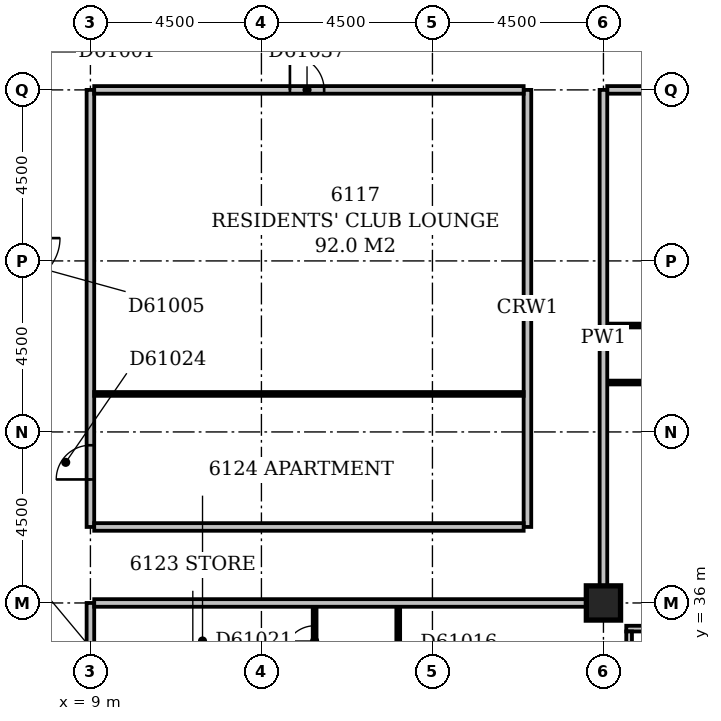
"""IFC4 building model, lengths in metres.
Left out: names, types, materials, properties, quantities, classifications, styles, units other than length and angle.
Written with IfcOpenShell. Run it as: python <this file> out.ifc"""

import sys

from ifc_helpers import new_model, si_unit, direction, frame, frame_2d, origin, origin_2d, place, context, subcontext, project, spatial, rectangle, extrude, element, fill, save


model = new_model("IFC4")
c1 = context("Model", 3, precision=1e-05, world=origin(), true_north=direction((0.0, 1.0)))
c2 = subcontext(c1, "Body", "Model", "MODEL_VIEW")
j1 = project(units=[si_unit("LENGTHUNIT", "METRE"), si_unit("PLANEANGLEUNIT", "RADIAN")], contexts=[c1])
p1 = place(None, origin())
s1 = spatial("IfcSite", under=j1, at=p1, CompositionType="ELEMENT")
p2 = place(p1, origin())
s2 = spatial("IfcBuilding", under=s1, at=p2, CompositionType="ELEMENT")
p3 = place(p2, frame((0.0, 0.0, 236.6)))
s3 = spatial("IfcBuildingStorey", under=s2, at=p3, CompositionType="ELEMENT", Elevation=236.6)
p4 = place(p3, frame((22.5, 36.0, -0.3), z_axis=(0.0, 0.0, 1.0), x_axis=(1.0, 0.0, 0.0)))
e1 = element("IfcColumn", 1, at=p4, inside=s3, PredefinedType="COLUMN", context=c2, shape_type="SweptSolid", body=[
    extrude(rectangle(XDim=0.9, YDim=0.9, at=origin_2d()), origin(), (0.0, 0.0, 1.0), 3.6),
])
p5 = place(p3, frame((23.175, 17.4, 0.0), z_axis=(0.0, 0.0, 1.0), x_axis=(0.0, 1.0, 0.0)))
e2 = element("IfcWall", 2, at=p5, inside=s3, PredefinedType="STANDARD", context=c2, shape_type="SweptSolid", body=[
    extrude(rectangle(XDim=17.85, YDim=0.15, at=frame_2d((8.925, 0.0))), origin(), (0.0, 0.0, 1.0), 2.7),
])
p6 = place(p5, frame((1.357, 0.0, 0.6)))
e3 = element("IfcOpeningElement", 3, at=p6, cuts=e2, PredefinedType="OPENING", context=c2, shape_type="SweptSolid", body=[
    extrude(rectangle(XDim=2.1, YDim=1.8, at=frame_2d((1.05, 0.9))), frame((0.0, 0.087, 0.0), z_axis=(0.0, -1.0, 0.0), x_axis=(1.0, 0.0, 0.0)), (0.0, 0.0, 1.0), 0.174),
])
p7 = place(p5, frame((6.15, 0.0, 0.6)))
e4 = element("IfcOpeningElement", 4, at=p7, cuts=e2, PredefinedType="OPENING", context=c2, shape_type="SweptSolid", body=[
    extrude(rectangle(XDim=2.4, YDim=1.8, at=frame_2d((1.2, 0.9))), frame((0.0, 0.087, 0.0), z_axis=(0.0, -1.0, 0.0), x_axis=(1.0, 0.0, 0.0)), (0.0, 0.0, 1.0), 0.174),
])
p8 = place(p5, frame((10.65, 0.0, 0.6)))
e5 = element("IfcOpeningElement", 5, at=p8, cuts=e2, PredefinedType="OPENING", context=c2, shape_type="SweptSolid", body=[
    extrude(rectangle(XDim=2.4, YDim=1.8, at=frame_2d((1.2, 0.9))), frame((0.0, 0.087, 0.0), z_axis=(0.0, -1.0, 0.0), x_axis=(1.0, 0.0, 0.0)), (0.0, 0.0, 1.0), 0.174),
])
p9 = place(p5, frame((15.15, 0.0, 0.6)))
e6 = element("IfcOpeningElement", 6, at=p9, cuts=e2, PredefinedType="OPENING", context=c2, shape_type="SweptSolid", body=[
    extrude(rectangle(XDim=2.4, YDim=1.8, at=frame_2d((1.2, 0.9))), frame((0.0, 0.087, 0.0), z_axis=(0.0, -1.0, 0.0), x_axis=(1.0, 0.0, 0.0)), (0.0, 0.0, 1.0), 0.174),
])
p10 = place(p3, frame((23.1, 35.325, 0.0), z_axis=(0.0, 0.0, 1.0), x_axis=(1.0, 0.0, 0.0)))
e7 = element("IfcWall", 7, at=p10, inside=s3, PredefinedType="STANDARD", context=c2, shape_type="SweptSolid", body=[
    extrude(rectangle(XDim=18.15, YDim=0.15, at=frame_2d((9.075, 0.0))), origin(), (0.0, 0.0, 1.0), 2.7),
])
p11 = place(p10, frame((0.45, 0.0, 0.6)))
e8 = element("IfcOpeningElement", 8, at=p11, cuts=e7, PredefinedType="OPENING", context=c2, shape_type="SweptSolid", body=[
    extrude(rectangle(XDim=2.4, YDim=1.8, at=frame_2d((1.2, 0.9))), frame((0.0, 0.087, 0.0), z_axis=(0.0, -1.0, 0.0), x_axis=(1.0, 0.0, 0.0)), (0.0, 0.0, 1.0), 0.174),
])
p12 = place(p10, frame((5.242, 0.0, 0.6)))
e9 = element("IfcOpeningElement", 9, at=p12, cuts=e7, PredefinedType="OPENING", context=c2, shape_type="SweptSolid", body=[
    extrude(rectangle(XDim=2.4, YDim=1.8, at=frame_2d((1.2, 0.9))), frame((0.0, 0.087, 0.0), z_axis=(0.0, -1.0, 0.0), x_axis=(1.0, 0.0, 0.0)), (0.0, 0.0, 1.0), 0.174),
])
p13 = place(p10, frame((9.45, 0.0, 0.6)))
e10 = element("IfcOpeningElement", 10, at=p13, cuts=e7, PredefinedType="OPENING", context=c2, shape_type="SweptSolid", body=[
    extrude(rectangle(XDim=2.4, YDim=1.8, at=frame_2d((1.2, 0.9))), frame((0.0, 0.087, 0.0), z_axis=(0.0, -1.0, 0.0), x_axis=(1.0, 0.0, 0.0)), (0.0, 0.0, 1.0), 0.174),
])
p14 = place(p10, frame((13.95, 0.0, 0.6)))
e11 = element("IfcOpeningElement", 11, at=p14, cuts=e7, PredefinedType="OPENING", context=c2, shape_type="SweptSolid", body=[
    extrude(rectangle(XDim=2.4, YDim=1.8, at=frame_2d((1.2, 0.9))), frame((0.0, 0.087, 0.0), z_axis=(0.0, -1.0, 0.0), x_axis=(1.0, 0.0, 0.0)), (0.0, 0.0, 1.0), 0.174),
])
p15 = place(p3, frame((17.1, 17.4, 0.0), z_axis=(0.0, 0.0, 1.0), x_axis=(0.0, 1.0, 0.0)))
e12 = element("IfcWall", 12, at=p15, inside=s3, PredefinedType="PARTITIONING", context=c2, shape_type="SweptSolid", body=[
    extrude(rectangle(XDim=18.5, YDim=0.1, at=frame_2d((9.25, 0.0))), origin(), (0.0, 0.0, 1.0), 3.3),
])
p16 = place(p15, frame((4.6, 0.0, 0.0)))
e13 = element("IfcOpeningElement", 13, at=p16, cuts=e12, PredefinedType="OPENING", context=c2, shape_type="SweptSolid", body=[
    extrude(rectangle(XDim=0.9, YDim=2.1, at=frame_2d((0.45, 1.05))), frame((0.0, 0.062, 0.0), z_axis=(0.0, -1.0, 0.0), x_axis=(1.0, 0.0, 0.0)), (0.0, 0.0, 1.0), 0.124),
])
p17 = place(p15, frame((10.25, 0.0, 0.0)))
e14 = element("IfcOpeningElement", 14, at=p17, cuts=e12, PredefinedType="OPENING", context=c2, shape_type="SweptSolid", body=[
    extrude(rectangle(XDim=0.9, YDim=2.1, at=frame_2d((0.45, 1.05))), frame((0.0, 0.062, 0.0), z_axis=(0.0, -1.0, 0.0), x_axis=(1.0, 0.0, 0.0)), (0.0, 0.0, 1.0), 0.124),
])
p18 = place(p15, frame((15.9, 0.0, 0.0)))
e15 = element("IfcOpeningElement", 15, at=p18, cuts=e12, PredefinedType="OPENING", context=c2, shape_type="SweptSolid", body=[
    extrude(rectangle(XDim=0.9, YDim=2.1, at=frame_2d((0.45, 1.05))), frame((0.0, 0.062, 0.0), z_axis=(0.0, -1.0, 0.0), x_axis=(1.0, 0.0, 0.0)), (0.0, 0.0, 1.0), 0.124),
])
p19 = place(p3, frame((9.0, 18.45, 0.0), z_axis=(0.0, 0.0, 1.0), x_axis=(0.0, 1.0, 0.0)))
e16 = element("IfcWall", 16, at=p19, inside=s3, PredefinedType="PARTITIONING", context=c2, shape_type="SweptSolid", body=[
    extrude(rectangle(XDim=17.55, YDim=0.2, at=frame_2d((8.775, 0.0))), origin(), (0.0, 0.0, 1.0), 3.3),
])
p20 = place(p19, frame((6.25, 0.0, 0.0)))
e17 = element("IfcOpeningElement", 17, at=p20, cuts=e16, PredefinedType="OPENING", context=c2, shape_type="SweptSolid", body=[
    extrude(rectangle(XDim=1.0, YDim=2.1, at=frame_2d((0.5, 1.05))), frame((0.0, 0.112, 0.0), z_axis=(0.0, -1.0, 0.0), x_axis=(1.0, 0.0, 0.0)), (0.0, 0.0, 1.0), 0.224),
])
p21 = place(p3, frame((14.9, 26.0, 0.0), z_axis=(0.0, 0.0, 1.0), x_axis=(0.0, 1.0, 0.0)))
e18 = element("IfcWall", 18, at=p21, inside=s3, PredefinedType="PARTITIONING", context=c2, shape_type="SweptSolid", body=[
    extrude(rectangle(XDim=9.9, YDim=0.1, at=frame_2d((4.95, 0.0))), origin(), (0.0, 0.0, 1.0), 3.3),
])
p22 = place(p21, frame((0.8, 0.0, 0.0)))
e19 = element("IfcOpeningElement", 19, at=p22, cuts=e18, PredefinedType="OPENING", context=c2, shape_type="SweptSolid", body=[
    extrude(rectangle(XDim=0.8, YDim=2.1, at=frame_2d((0.4, 1.05))), frame((0.0, 0.062, 0.0), z_axis=(0.0, -1.0, 0.0), x_axis=(1.0, 0.0, 0.0)), (0.0, 0.0, 1.0), 0.124),
])
p23 = place(p21, frame((3.1, 0.0, 0.0)))
e20 = element("IfcOpeningElement", 20, at=p23, cuts=e18, PredefinedType="OPENING", context=c2, shape_type="SweptSolid", body=[
    extrude(rectangle(XDim=0.8, YDim=2.1, at=frame_2d((0.4, 1.05))), frame((0.0, 0.062, 0.0), z_axis=(0.0, -1.0, 0.0), x_axis=(1.0, 0.0, 0.0)), (0.0, 0.0, 1.0), 0.124),
])
p24 = place(p21, frame((6.8, 0.0, 0.0)))
e21 = element("IfcOpeningElement", 21, at=p24, cuts=e18, PredefinedType="OPENING", context=c2, shape_type="SweptSolid", body=[
    extrude(rectangle(XDim=0.8, YDim=2.1, at=frame_2d((0.4, 1.05))), frame((0.0, 0.062, 0.0), z_axis=(0.0, -1.0, 0.0), x_axis=(1.0, 0.0, 0.0)), (0.0, 0.0, 1.0), 0.124),
])
p25 = place(p21, frame((8.6, 0.0, 0.0)))
e22 = element("IfcOpeningElement", 22, at=p25, cuts=e18, PredefinedType="OPENING", context=c2, shape_type="SweptSolid", body=[
    extrude(rectangle(XDim=0.8, YDim=2.1, at=frame_2d((0.4, 1.05))), frame((0.0, 0.062, 0.0), z_axis=(0.0, -1.0, 0.0), x_axis=(1.0, 0.0, 0.0)), (0.0, 0.0, 1.0), 0.124),
])
p26 = place(p21, frame((5.1, 0.0, 0.0)))
e23 = element("IfcOpeningElement", 23, at=p26, cuts=e18, PredefinedType="OPENING", context=c2, shape_type="SweptSolid", body=[
    extrude(rectangle(XDim=0.8, YDim=2.1, at=frame_2d((0.4, 1.05))), frame((0.0, 0.062, 0.0), z_axis=(0.0, -1.0, 0.0), x_axis=(1.0, 0.0, 0.0)), (0.0, 0.0, 1.0), 0.124),
])
p27 = place(p3, frame((9.1, 36.0, 0.0), z_axis=(0.0, 0.0, 1.0), x_axis=(1.0, 0.0, 0.0)))
e24 = element("IfcWall", 24, at=p27, inside=s3, PredefinedType="PARTITIONING", context=c2, shape_type="SweptSolid", body=[
    extrude(rectangle(XDim=12.95, YDim=0.2, at=frame_2d((6.475, 0.0))), origin(), (0.0, 0.0, 1.0), 3.3),
])
p28 = place(p3, frame((22.5, 36.45, 0.0), z_axis=(0.0, 0.0, 1.0), x_axis=(0.0, 1.0, 0.0)))
e25 = element("IfcWall", 25, at=p28, inside=s3, PredefinedType="PARTITIONING", context=c2, shape_type="SweptSolid", body=[
    extrude(rectangle(XDim=13.05, YDim=0.2, at=frame_2d((6.525, 0.0))), origin(), (0.0, 0.0, 1.0), 3.3),
])
p29 = place(p3, frame((9.0, 38.0, 0.0), z_axis=(0.0, 0.0, 1.0), x_axis=(0.0, 1.0, 0.0)))
e26 = element("IfcWall", 26, at=p29, inside=s3, PredefinedType="PARTITIONING", context=c2, shape_type="SweptSolid", body=[
    extrude(rectangle(XDim=11.5, YDim=0.2, at=frame_2d((5.75, 0.0))), origin(), (0.0, 0.0, 1.0), 3.3),
])
p30 = place(p29, frame((1.25, 0.0, 0.0)))
e27 = element("IfcOpeningElement", 27, at=p30, cuts=e26, PredefinedType="OPENING", context=c2, shape_type="SweptSolid", body=[
    extrude(rectangle(XDim=0.9, YDim=2.1, at=frame_2d((0.45, 1.05))), frame((0.0, 0.112, 0.0), z_axis=(0.0, -1.0, 0.0), x_axis=(1.0, 0.0, 0.0)), (0.0, 0.0, 1.0), 0.224),
])
p31 = place(p3, frame((9.1, 38.0, 0.0), z_axis=(0.0, 0.0, 1.0), x_axis=(1.0, 0.0, 0.0)))
e28 = element("IfcWall", 28, at=p31, inside=s3, PredefinedType="PARTITIONING", context=c2, shape_type="SweptSolid", body=[
    extrude(rectangle(XDim=11.3, YDim=0.2, at=frame_2d((5.65, 0.0))), origin(), (0.0, 0.0, 1.0), 3.3),
])
p32 = place(p3, frame((20.5, 38.0, 0.0), z_axis=(0.0, 0.0, 1.0), x_axis=(0.0, 1.0, 0.0)))
e29 = element("IfcWall", 29, at=p32, inside=s3, PredefinedType="PARTITIONING", context=c2, shape_type="SweptSolid", body=[
    extrude(rectangle(XDim=11.5, YDim=0.2, at=frame_2d((5.75, 0.0))), origin(), (0.0, 0.0, 1.0), 3.3),
])
p33 = place(p3, frame((9.1, 41.5, 0.0), z_axis=(0.0, 0.0, 1.0), x_axis=(1.0, 0.0, 0.0)))
e30 = element("IfcWall", 30, at=p33, inside=s3, PredefinedType="PARTITIONING", context=c2, shape_type="SweptSolid", body=[
    extrude(rectangle(XDim=11.3, YDim=0.1, at=frame_2d((5.65, 0.0))), origin(), (0.0, 0.0, 1.0), 3.3),
])
p34 = place(p3, frame((22.6, 41.8, 0.0), z_axis=(0.0, 0.0, 1.0), x_axis=(1.0, 0.0, 0.0)))
e31 = element("IfcWall", 31, at=p34, inside=s3, PredefinedType="PARTITIONING", context=c2, shape_type="SweptSolid", body=[
    extrude(rectangle(XDim=8.8, YDim=0.1, at=frame_2d((4.4, 0.0))), origin(), (0.0, 0.0, 1.0), 3.3),
])
p35 = place(p34, frame((1.7, 0.0, 0.0)))
e32 = element("IfcOpeningElement", 32, at=p35, cuts=e31, PredefinedType="OPENING", context=c2, shape_type="SweptSolid", body=[
    extrude(rectangle(XDim=0.9, YDim=2.1, at=frame_2d((0.45, 1.05))), frame((0.0, 0.062, 0.0), z_axis=(0.0, -1.0, 0.0), x_axis=(1.0, 0.0, 0.0)), (0.0, 0.0, 1.0), 0.124),
])
p36 = place(p34, frame((5.05, 0.0, 0.0)))
e33 = element("IfcOpeningElement", 33, at=p36, cuts=e31, PredefinedType="OPENING", context=c2, shape_type="SweptSolid", body=[
    extrude(rectangle(XDim=0.9, YDim=2.1, at=frame_2d((0.45, 1.05))), frame((0.0, 0.062, 0.0), z_axis=(0.0, -1.0, 0.0), x_axis=(1.0, 0.0, 0.0)), (0.0, 0.0, 1.0), 0.124),
])
p37 = place(p3, frame((22.6, 43.3, 0.0), z_axis=(0.0, 0.0, 1.0), x_axis=(1.0, 0.0, 0.0)))
e34 = element("IfcWall", 34, at=p37, inside=s3, PredefinedType="PARTITIONING", context=c2, shape_type="SweptSolid", body=[
    extrude(rectangle(XDim=4.85, YDim=0.1, at=frame_2d((2.425, 0.0))), origin(), (0.0, 0.0, 1.0), 3.3),
])
p38 = place(p37, frame((1.95, 0.0, 0.0)))
e35 = element("IfcOpeningElement", 35, at=p38, cuts=e34, PredefinedType="OPENING", context=c2, shape_type="SweptSolid", body=[
    extrude(rectangle(XDim=0.9, YDim=2.1, at=frame_2d((0.45, 1.05))), frame((0.0, 0.062, 0.0), z_axis=(0.0, -1.0, 0.0), x_axis=(1.0, 0.0, 0.0)), (0.0, 0.0, 1.0), 0.124),
])
p39 = place(p3, frame((9.1, 49.5, 0.0), z_axis=(0.0, 0.0, 1.0), x_axis=(1.0, 0.0, 0.0)))
e36 = element("IfcWall", 36, at=p39, inside=s3, PredefinedType="PARTITIONING", context=c2, shape_type="SweptSolid", body=[
    extrude(rectangle(XDim=11.3, YDim=0.2, at=frame_2d((5.65, 0.0))), origin(), (0.0, 0.0, 1.0), 3.3),
])
p40 = place(p39, frame((5.15, 0.0, 0.0)))
e37 = element("IfcOpeningElement", 37, at=p40, cuts=e36, PredefinedType="OPENING", context=c2, shape_type="SweptSolid", body=[
    extrude(rectangle(XDim=0.9, YDim=2.1, at=frame_2d((0.45, 1.05))), frame((0.0, 0.112, 0.0), z_axis=(0.0, -1.0, 0.0), x_axis=(1.0, 0.0, 0.0)), (0.0, 0.0, 1.0), 0.224),
])
p41 = place(p3, frame((22.6, 49.5, 0.0), z_axis=(0.0, 0.0, 1.0), x_axis=(1.0, 0.0, 0.0)))
e38 = element("IfcWall", 38, at=p41, inside=s3, PredefinedType="PARTITIONING", context=c2, shape_type="SweptSolid", body=[
    extrude(rectangle(XDim=21.95, YDim=0.2, at=frame_2d((10.975, 0.0))), origin(), (0.0, 0.0, 1.0), 3.3),
])
p42 = place(p41, frame((5.2, 0.0, 0.0)))
e39 = element("IfcOpeningElement", 39, at=p42, cuts=e38, PredefinedType="OPENING", context=c2, shape_type="SweptSolid", body=[
    extrude(rectangle(XDim=1.0, YDim=2.1, at=frame_2d((0.5, 1.05))), frame((0.0, 0.112, 0.0), z_axis=(0.0, -1.0, 0.0), x_axis=(1.0, 0.0, 0.0)), (0.0, 0.0, 1.0), 0.224),
])
p43 = place(p41, frame((9.2, 0.0, 0.0)))
e40 = element("IfcOpeningElement", 40, at=p43, cuts=e38, PredefinedType="OPENING", context=c2, shape_type="SweptSolid", body=[
    extrude(rectangle(XDim=1.0, YDim=2.1, at=frame_2d((0.5, 1.05))), frame((0.0, 0.112, 0.0), z_axis=(0.0, -1.0, 0.0), x_axis=(1.0, 0.0, 0.0)), (0.0, 0.0, 1.0), 0.224),
])
p44 = place(p25, origin())
e41 = element("IfcDoor", 41, at=p44, inside=s3, OperationType="SINGLE_SWING_LEFT", PredefinedType="DOOR", context=c2, shape_type="SweptSolid", body=[
    extrude(rectangle(XDim=0.8, YDim=2.1, at=frame_2d((0.4, 1.05))), frame((0.0, 0.025, 0.0), z_axis=(0.0, -1.0, 0.0), x_axis=(1.0, 0.0, 0.0)), (0.0, 0.0, 1.0), 0.05),
])
fill(e22, e41)
p45 = place(p30, origin())
e42 = element("IfcDoor", 42, at=p45, inside=s3, OperationType="SINGLE_SWING_LEFT", PredefinedType="DOOR", context=c2, shape_type="SweptSolid", body=[
    extrude(rectangle(XDim=0.9, YDim=2.1, at=frame_2d((0.45, 1.05))), frame((0.0, 0.025, 0.0), z_axis=(0.0, -1.0, 0.0), x_axis=(1.0, 0.0, 0.0)), (0.0, 0.0, 1.0), 0.05),
])
fill(e27, e42)
p46 = place(p40, origin())
e43 = element("IfcDoor", 43, at=p46, inside=s3, OperationType="SINGLE_SWING_LEFT", PredefinedType="DOOR", context=c2, shape_type="SweptSolid", body=[
    extrude(rectangle(XDim=0.9, YDim=2.1, at=frame_2d((0.45, 1.05))), frame((0.0, 0.025, 0.0), z_axis=(0.0, -1.0, 0.0), x_axis=(1.0, 0.0, 0.0)), (0.0, 0.0, 1.0), 0.05),
])
fill(e37, e43)
save(model, sys.argv[1])
